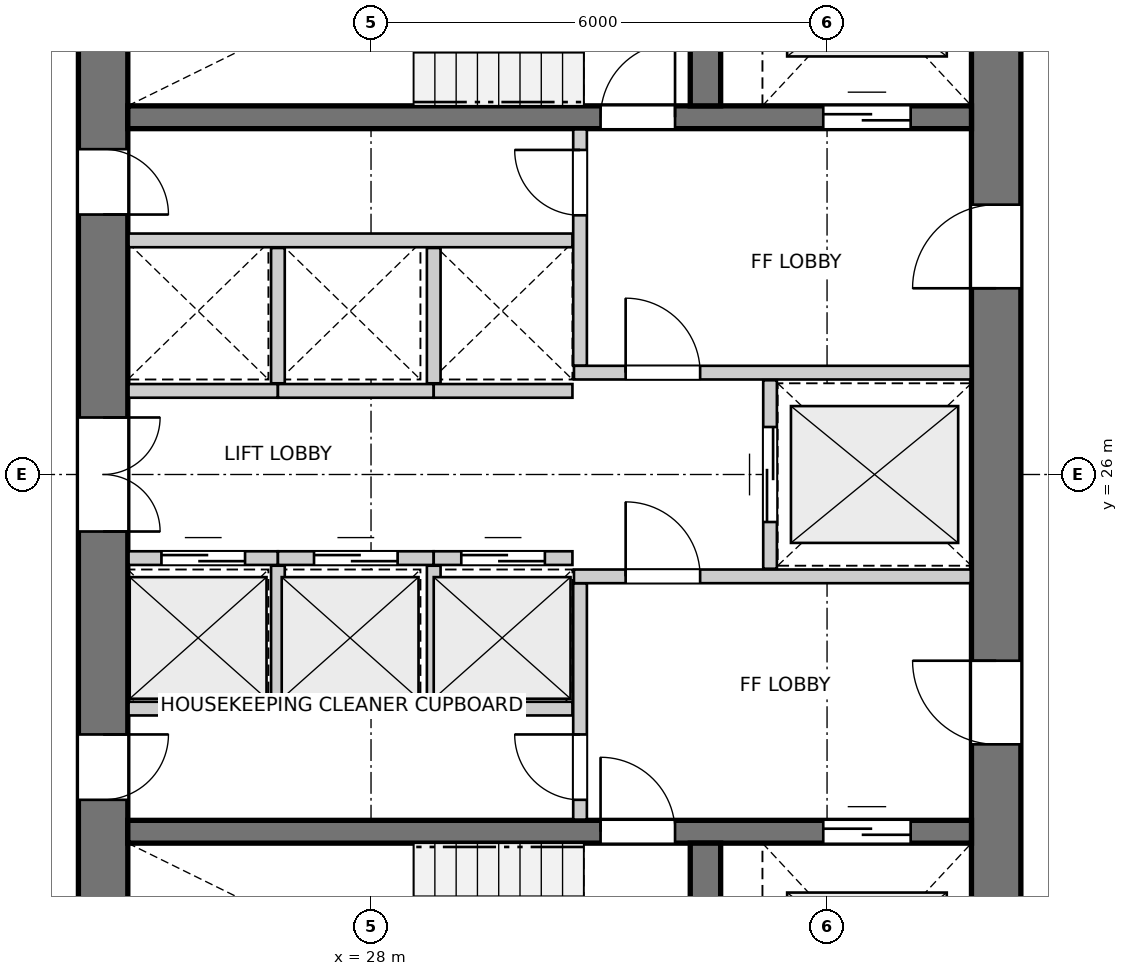
"""IFC4 building model, lengths in metres.
Left out: names, types, materials, properties, quantities, classifications, styles, units other than length and angle.
Written with IfcOpenShell. Run it as: python <this file> out.ifc"""

import sys

from ifc_helpers import new_model, si_unit, direction, frame, frame_2d, origin, place, context, subcontext, project, spatial, rectangle, extrude, source, transform, mapped, element, fill, save


model = new_model("IFC4")
c1 = context("Model", 3, precision=1e-05, world=origin(), true_north=direction((0.0, 1.0)))
c2 = subcontext(c1, "Body", "Model", "MODEL_VIEW")
j1 = project(units=[si_unit("LENGTHUNIT", "METRE"), si_unit("PLANEANGLEUNIT", "RADIAN")], contexts=[c1])
p1 = place(None, origin())
s1 = spatial("IfcSite", under=j1, at=p1, CompositionType="ELEMENT")
p2 = place(p1, origin())
s2 = spatial("IfcBuilding", under=s1, at=p2, CompositionType="ELEMENT")
p3 = place(p2, frame((0.0, 0.0, 76.8)))
s3 = spatial("IfcBuildingStorey", under=s2, at=p3, CompositionType="ELEMENT", Elevation=76.8)
p4 = place(p3, frame((24.475, 33.8, 0.0), z_axis=(0.0, 0.0, 1.0), x_axis=(0.0, -1.0, 0.0)))
e1 = element("IfcWall", 1, at=p4, inside=s3, PredefinedType="SHEAR", context=c2, shape_type="SweptSolid", body=[
    extrude(rectangle(XDim=15.6, YDim=0.65, at=frame_2d((7.8, 0.0))), origin(), (0.0, 0.0, 1.0), 2.935),
])
p5 = place(p4, frame((7.05, 0.0, 0.0)))
e2 = element("IfcOpeningElement", 2, at=p5, cuts=e1, PredefinedType="OPENING", context=c2, shape_type="SweptSolid", body=[
    extrude(rectangle(XDim=1.5, YDim=2.15, at=frame_2d((0.75, 1.075))), frame((0.0, 0.335, 0.0), z_axis=(0.0, -1.0, 0.0), x_axis=(1.0, 0.0, 0.0)), (0.0, 0.0, 1.0), 0.67),
])
p6 = place(p4, frame((3.52, 0.0, 0.0)))
e3 = element("IfcOpeningElement", 3, at=p6, cuts=e1, PredefinedType="OPENING", context=c2, shape_type="SweptSolid", body=[
    extrude(rectangle(XDim=0.86, YDim=2.05, at=frame_2d((0.43, 1.025))), frame((0.0, 0.335, 0.0), z_axis=(0.0, -1.0, 0.0), x_axis=(1.0, 0.0, 0.0)), (0.0, 0.0, 1.0), 0.67),
])
p7 = place(p4, frame((11.22, 0.0, 0.0)))
e4 = element("IfcOpeningElement", 4, at=p7, cuts=e1, PredefinedType="OPENING", context=c2, shape_type="SweptSolid", body=[
    extrude(rectangle(XDim=0.86, YDim=2.05, at=frame_2d((0.43, 1.025))), frame((0.0, 0.335, 0.0), z_axis=(0.0, -1.0, 0.0), x_axis=(1.0, 0.0, 0.0)), (0.0, 0.0, 1.0), 0.67),
])
p8 = place(p3, frame((36.225, 18.2, 0.0), z_axis=(0.0, 0.0, 1.0), x_axis=(0.0, 1.0, 0.0)))
e5 = element("IfcWall", 5, at=p8, inside=s3, PredefinedType="SHEAR", context=c2, shape_type="SweptSolid", body=[
    extrude(rectangle(XDim=15.6, YDim=0.65, at=frame_2d((7.8, 0.0))), origin(), (0.0, 0.0, 1.0), 2.935),
])
p9 = place(p8, frame((4.25, 0.0, 0.0)))
e6 = element("IfcOpeningElement", 6, at=p9, cuts=e5, PredefinedType="OPENING", context=c2, shape_type="SweptSolid", body=[
    extrude(rectangle(XDim=1.1, YDim=2.15, at=frame_2d((0.55, 1.075))), frame((0.0, 0.335, 0.0), z_axis=(0.0, -1.0, 0.0), x_axis=(1.0, 0.0, 0.0)), (0.0, 0.0, 1.0), 0.67),
])
p10 = place(p8, frame((10.25, 0.0, 0.0)))
e7 = element("IfcOpeningElement", 7, at=p10, cuts=e5, PredefinedType="OPENING", context=c2, shape_type="SweptSolid", body=[
    extrude(rectangle(XDim=1.1, YDim=2.15, at=frame_2d((0.55, 1.075))), frame((0.0, 0.335, 0.0), z_axis=(0.0, -1.0, 0.0), x_axis=(1.0, 0.0, 0.0)), (0.0, 0.0, 1.0), 0.67),
])
p11 = place(p3, frame((24.8, 21.3, 0.0), z_axis=(0.0, 0.0, 1.0), x_axis=(1.0, 0.0, 0.0)))
e8 = element("IfcWall", 8, at=p11, inside=s3, PredefinedType="SHEAR", context=c2, shape_type="SweptSolid", body=[
    extrude(rectangle(XDim=11.1, YDim=0.3, at=frame_2d((5.55, 0.0))), origin(), (0.0, 0.0, 1.0), 2.935),
])
p12 = place(p11, frame((6.22, 0.0, 0.0)))
e9 = element("IfcOpeningElement", 9, at=p12, cuts=e8, PredefinedType="OPENING", context=c2, shape_type="SweptSolid", body=[
    extrude(rectangle(XDim=0.98, YDim=2.15, at=frame_2d((0.49, 1.075))), frame((0.0, 0.16, 0.0), z_axis=(0.0, -1.0, 0.0), x_axis=(1.0, 0.0, 0.0)), (0.0, 0.0, 1.0), 0.32),
])
p13 = place(p11, frame((9.15, 0.0, 0.0)))
e10 = element("IfcOpeningElement", 10, at=p13, cuts=e8, PredefinedType="OPENING", context=c2, shape_type="SweptSolid", body=[
    extrude(rectangle(XDim=1.15, YDim=2.15, at=frame_2d((0.575, 1.075))), frame((0.0, 0.16, 0.0), z_axis=(0.0, -1.0, 0.0), x_axis=(1.0, 0.0, 0.0)), (0.0, 0.0, 1.0), 0.32),
])
p14 = place(p3, frame((32.4, 18.2, 0.0), z_axis=(0.0, 0.0, 1.0), x_axis=(0.0, 1.0, 0.0)))
e11 = element("IfcWall", 11, at=p14, inside=s3, PredefinedType="SHEAR", context=c2, shape_type="SweptSolid", body=[
    extrude(rectangle(XDim=2.95, YDim=0.4, at=frame_2d((1.475, 0.0))), origin(), (0.0, 0.0, 1.0), 2.935),
])
p15 = place(p3, frame((24.8, 30.7, 0.0), z_axis=(0.0, 0.0, 1.0), x_axis=(1.0, 0.0, 0.0)))
e12 = element("IfcWall", 12, at=p15, inside=s3, PredefinedType="SHEAR", context=c2, shape_type="SweptSolid", body=[
    extrude(rectangle(XDim=11.1, YDim=0.3, at=frame_2d((5.55, 0.0))), origin(), (0.0, 0.0, 1.0), 2.935),
])
p16 = place(p15, frame((6.22, 0.0, 0.0)))
e13 = element("IfcOpeningElement", 13, at=p16, cuts=e12, PredefinedType="OPENING", context=c2, shape_type="SweptSolid", body=[
    extrude(rectangle(XDim=0.98, YDim=2.15, at=frame_2d((0.49, 1.075))), frame((0.0, 0.16, 0.0), z_axis=(0.0, -1.0, 0.0), x_axis=(1.0, 0.0, 0.0)), (0.0, 0.0, 1.0), 0.32),
])
p17 = place(p15, frame((9.15, 0.0, 0.0)))
e14 = element("IfcOpeningElement", 14, at=p17, cuts=e12, PredefinedType="OPENING", context=c2, shape_type="SweptSolid", body=[
    extrude(rectangle(XDim=1.15, YDim=2.15, at=frame_2d((0.575, 1.075))), frame((0.0, 0.16, 0.0), z_axis=(0.0, -1.0, 0.0), x_axis=(1.0, 0.0, 0.0)), (0.0, 0.0, 1.0), 0.32),
])
p18 = place(p3, frame((32.4, 30.85, 0.0), z_axis=(0.0, 0.0, 1.0), x_axis=(0.0, 1.0, 0.0)))
e15 = element("IfcWall", 15, at=p18, inside=s3, PredefinedType="SHEAR", context=c2, shape_type="SweptSolid", body=[
    extrude(rectangle(XDim=2.95, YDim=0.4, at=frame_2d((1.475, 0.0))), origin(), (0.0, 0.0, 1.0), 2.935),
])
p19 = place(p3, frame((30.75, 21.46, 0.0), z_axis=(0.0, 0.0, 1.0), x_axis=(0.0, 1.0, 0.0)))
e16 = element("IfcWall", 16, at=p19, inside=s3, PredefinedType="PARTITIONING", context=c2, shape_type="SweptSolid", body=[
    extrude(rectangle(XDim=3.11, YDim=0.18, at=frame_2d((1.555, 0.0))), origin(), (0.0, 0.0, 1.0), 2.935),
])
p20 = place(p19, frame((0.26, 0.0, 0.0)))
e17 = element("IfcOpeningElement", 17, at=p20, cuts=e16, PredefinedType="OPENING", context=c2, shape_type="SweptSolid", body=[
    extrude(rectangle(XDim=0.86, YDim=2.05, at=frame_2d((0.43, 1.025))), frame((0.0, 0.1, 0.0), z_axis=(0.0, -1.0, 0.0), x_axis=(1.0, 0.0, 0.0)), (0.0, 0.0, 1.0), 0.2),
])
p21 = place(p3, frame((30.67, 24.66, 0.0), z_axis=(0.0, 0.0, 1.0), x_axis=(1.0, 0.0, 0.0)))
e18 = element("IfcWall", 18, at=p21, inside=s3, PredefinedType="PARTITIONING", context=c2, shape_type="SweptSolid", body=[
    extrude(rectangle(XDim=5.22, YDim=0.18, at=frame_2d((2.61, 0.0))), origin(), (0.0, 0.0, 1.0), 2.935),
])
p22 = place(p21, frame((0.68, 0.0, 0.0)))
e19 = element("IfcOpeningElement", 19, at=p22, cuts=e18, PredefinedType="OPENING", context=c2, shape_type="SweptSolid", body=[
    extrude(rectangle(XDim=0.98, YDim=2.15, at=frame_2d((0.49, 1.075))), frame((0.0, 0.1, 0.0), z_axis=(0.0, -1.0, 0.0), x_axis=(1.0, 0.0, 0.0)), (0.0, 0.0, 1.0), 0.2),
])
p23 = place(p3, frame((30.75, 27.43, 0.0), z_axis=(0.0, 0.0, 1.0), x_axis=(0.0, 1.0, 0.0)))
e20 = element("IfcWall", 20, at=p23, inside=s3, PredefinedType="PARTITIONING", context=c2, shape_type="SweptSolid", body=[
    extrude(rectangle(XDim=3.11, YDim=0.18, at=frame_2d((1.555, 0.0))), origin(), (0.0, 0.0, 1.0), 2.935),
])
p24 = place(p23, frame((1.98, 0.0, 0.0)))
e21 = element("IfcOpeningElement", 21, at=p24, cuts=e20, PredefinedType="OPENING", context=c2, shape_type="SweptSolid", body=[
    extrude(rectangle(XDim=0.86, YDim=2.05, at=frame_2d((0.43, 1.025))), frame((0.0, 0.1, 0.0), z_axis=(0.0, -1.0, 0.0), x_axis=(1.0, 0.0, 0.0)), (0.0, 0.0, 1.0), 0.2),
])
p25 = place(p3, frame((30.67, 27.34, 0.0), z_axis=(0.0, 0.0, 1.0), x_axis=(1.0, 0.0, 0.0)))
e22 = element("IfcWall", 22, at=p25, inside=s3, PredefinedType="PARTITIONING", context=c2, shape_type="SweptSolid", body=[
    extrude(rectangle(XDim=5.22, YDim=0.18, at=frame_2d((2.61, 0.0))), origin(), (0.0, 0.0, 1.0), 2.935),
])
p26 = place(p25, frame((0.68, 0.0, 0.0)))
e23 = element("IfcOpeningElement", 23, at=p26, cuts=e22, PredefinedType="OPENING", context=c2, shape_type="SweptSolid", body=[
    extrude(rectangle(XDim=0.98, YDim=2.15, at=frame_2d((0.49, 1.075))), frame((0.0, 0.1, 0.0), z_axis=(0.0, -1.0, 0.0), x_axis=(1.0, 0.0, 0.0)), (0.0, 0.0, 1.0), 0.2),
])
p27 = place(p3, frame((33.25, 24.76, 0.0), z_axis=(0.0, 0.0, 1.0), x_axis=(0.0, 1.0, 0.0)))
e24 = element("IfcWall", 24, at=p27, inside=s3, PredefinedType="PARTITIONING", context=c2, shape_type="SweptSolid", body=[
    extrude(rectangle(XDim=2.48, YDim=0.18, at=frame_2d((1.24, 0.0))), origin(), (0.0, 0.0, 1.0), 2.935),
])
p28 = place(p27, frame((0.615, 0.0, 0.0)))
e25 = element("IfcOpeningElement", 25, at=p28, cuts=e24, PredefinedType="OPENING", context=c2, shape_type="SweptSolid", body=[
    extrude(rectangle(XDim=1.25, YDim=2.15, at=frame_2d((0.625, 1.075))), frame((0.0, 0.1, 0.0), z_axis=(0.0, -1.0, 0.0), x_axis=(1.0, 0.0, 0.0)), (0.0, 0.0, 1.0), 0.2),
])
p29 = place(p3, frame((24.81, 22.92, 0.0), z_axis=(0.0, 0.0, 1.0), x_axis=(1.0, 0.0, 0.0)))
e26 = element("IfcWall", 26, at=p29, inside=s3, PredefinedType="PARTITIONING", context=c2, shape_type="SweptSolid", body=[
    extrude(rectangle(XDim=5.84, YDim=0.18, at=frame_2d((2.92, 0.0))), origin(), (0.0, 0.0, 1.0), 2.935),
])
p30 = place(p3, frame((24.81, 24.9, 0.0), z_axis=(0.0, 0.0, 1.0), x_axis=(1.0, 0.0, 0.0)))
e27 = element("IfcWall", 27, at=p30, inside=s3, PredefinedType="PARTITIONING", context=c2, shape_type="SweptSolid", body=[
    extrude(rectangle(XDim=1.965, YDim=0.18, at=frame_2d((0.982, 0.0))), origin(), (0.0, 0.0, 1.0), 2.935),
])
p31 = place(p30, frame((0.433, 0.0, 0.0)))
e28 = element("IfcOpeningElement", 28, at=p31, cuts=e27, PredefinedType="OPENING", context=c2, shape_type="SweptSolid", body=[
    extrude(rectangle(XDim=1.1, YDim=2.15, at=frame_2d((0.55, 1.075))), frame((0.0, 0.1, 0.0), z_axis=(0.0, -1.0, 0.0), x_axis=(1.0, 0.0, 0.0)), (0.0, 0.0, 1.0), 0.2),
])
p32 = place(p3, frame((26.775, 24.9, 0.0), z_axis=(0.0, 0.0, 1.0), x_axis=(1.0, 0.0, 0.0)))
e29 = element("IfcWall", 29, at=p32, inside=s3, PredefinedType="PARTITIONING", context=c2, shape_type="SweptSolid", body=[
    extrude(rectangle(XDim=2.05, YDim=0.18, at=frame_2d((1.025, 0.0))), origin(), (0.0, 0.0, 1.0), 2.935),
])
p33 = place(p32, frame((0.475, 0.0, 0.0)))
e30 = element("IfcOpeningElement", 30, at=p33, cuts=e29, PredefinedType="OPENING", context=c2, shape_type="SweptSolid", body=[
    extrude(rectangle(XDim=1.1, YDim=2.15, at=frame_2d((0.55, 1.075))), frame((0.0, 0.1, 0.0), z_axis=(0.0, -1.0, 0.0), x_axis=(1.0, 0.0, 0.0)), (0.0, 0.0, 1.0), 0.2),
])
p34 = place(p3, frame((26.775, 23.02, 0.0), z_axis=(0.0, 0.0, 1.0), x_axis=(0.0, 1.0, 0.0)))
e31 = element("IfcWall", 31, at=p34, inside=s3, PredefinedType="PARTITIONING", context=c2, shape_type="SweptSolid", body=[
    extrude(rectangle(XDim=1.78, YDim=0.18, at=frame_2d((0.89, 0.0))), origin(), (0.0, 0.0, 1.0), 2.935),
])
p35 = place(p3, frame((28.825, 24.9, 0.0), z_axis=(0.0, 0.0, 1.0), x_axis=(1.0, 0.0, 0.0)))
e32 = element("IfcWall", 32, at=p35, inside=s3, PredefinedType="PARTITIONING", context=c2, shape_type="SweptSolid", body=[
    extrude(rectangle(XDim=1.825, YDim=0.18, at=frame_2d((0.913, 0.0))), origin(), (0.0, 0.0, 1.0), 2.935),
])
p36 = place(p35, frame((0.363, 0.0, 0.0)))
e33 = element("IfcOpeningElement", 33, at=p36, cuts=e32, PredefinedType="OPENING", context=c2, shape_type="SweptSolid", body=[
    extrude(rectangle(XDim=1.1, YDim=2.15, at=frame_2d((0.55, 1.075))), frame((0.0, 0.1, 0.0), z_axis=(0.0, -1.0, 0.0), x_axis=(1.0, 0.0, 0.0)), (0.0, 0.0, 1.0), 0.2),
])
p37 = place(p3, frame((28.825, 23.02, 0.0), z_axis=(0.0, 0.0, 1.0), x_axis=(0.0, 1.0, 0.0)))
e34 = element("IfcWall", 34, at=p37, inside=s3, PredefinedType="PARTITIONING", context=c2, shape_type="SweptSolid", body=[
    extrude(rectangle(XDim=1.78, YDim=0.18, at=frame_2d((0.89, 0.0))), origin(), (0.0, 0.0, 1.0), 2.935),
])
p38 = place(p3, frame((24.81, 29.08, 0.0), z_axis=(0.0, 0.0, 1.0), x_axis=(1.0, 0.0, 0.0)))
e35 = element("IfcWall", 35, at=p38, inside=s3, PredefinedType="PARTITIONING", context=c2, shape_type="SweptSolid", body=[
    extrude(rectangle(XDim=5.84, YDim=0.18, at=frame_2d((2.92, 0.0))), origin(), (0.0, 0.0, 1.0), 2.935),
])
p39 = place(p3, frame((24.81, 27.1, 0.0), z_axis=(0.0, 0.0, 1.0), x_axis=(1.0, 0.0, 0.0)))
e36 = element("IfcWall", 36, at=p39, inside=s3, PredefinedType="PARTITIONING", context=c2, shape_type="SweptSolid", body=[
    extrude(rectangle(XDim=1.965, YDim=0.18, at=frame_2d((0.982, 0.0))), origin(), (0.0, 0.0, 1.0), 2.935),
])
p40 = place(p3, frame((26.775, 27.1, 0.0), z_axis=(0.0, 0.0, 1.0), x_axis=(1.0, 0.0, 0.0)))
e37 = element("IfcWall", 37, at=p40, inside=s3, PredefinedType="PARTITIONING", context=c2, shape_type="SweptSolid", body=[
    extrude(rectangle(XDim=2.05, YDim=0.18, at=frame_2d((1.025, 0.0))), origin(), (0.0, 0.0, 1.0), 2.935),
])
p41 = place(p3, frame((26.775, 27.2, 0.0), z_axis=(0.0, 0.0, 1.0), x_axis=(0.0, 1.0, 0.0)))
e38 = element("IfcWall", 38, at=p41, inside=s3, PredefinedType="PARTITIONING", context=c2, shape_type="SweptSolid", body=[
    extrude(rectangle(XDim=1.78, YDim=0.18, at=frame_2d((0.89, 0.0))), origin(), (0.0, 0.0, 1.0), 2.935),
])
p42 = place(p3, frame((28.825, 27.1, 0.0), z_axis=(0.0, 0.0, 1.0), x_axis=(1.0, 0.0, 0.0)))
e39 = element("IfcWall", 39, at=p42, inside=s3, PredefinedType="PARTITIONING", context=c2, shape_type="SweptSolid", body=[
    extrude(rectangle(XDim=1.825, YDim=0.18, at=frame_2d((0.913, 0.0))), origin(), (0.0, 0.0, 1.0), 2.935),
])
p43 = place(p3, frame((28.825, 27.2, 0.0), z_axis=(0.0, 0.0, 1.0), x_axis=(0.0, 1.0, 0.0)))
e40 = element("IfcWall", 40, at=p43, inside=s3, PredefinedType="PARTITIONING", context=c2, shape_type="SweptSolid", body=[
    extrude(rectangle(XDim=1.78, YDim=0.18, at=frame_2d((0.89, 0.0))), origin(), (0.0, 0.0, 1.0), 2.935),
])
m1 = source(origin(), c2, "Body", "SweptSolid", [
    extrude(rectangle(XDim=0.98, YDim=2.15, at=frame_2d((0.49, 1.075))), frame((0.0, 0.025, 0.0), z_axis=(0.0, -1.0, 0.0), x_axis=(1.0, 0.0, 0.0)), (0.0, 0.0, 1.0), 0.05),
])
p44 = place(p12, origin())
e41 = element("IfcDoor", 41, at=p44, inside=s3, OperationType="SINGLE_SWING_LEFT", PredefinedType="DOOR", context=c2, shape_type="MappedRepresentation", body=[
    mapped(m1, transform((0.0, 0.0, 0.0), x_axis=(1.0, 0.0, 0.0), y_axis=(0.0, 1.0, 0.0), z_axis=(0.0, 0.0, 1.0), scale=1.0)),
])
fill(e9, e41)
m2 = source(origin(), c2, "Body", "SweptSolid", [
    extrude(rectangle(XDim=1.15, YDim=2.15, at=frame_2d((0.575, 1.075))), frame((0.0, 0.025, 0.0), z_axis=(0.0, -1.0, 0.0), x_axis=(1.0, 0.0, 0.0)), (0.0, 0.0, 1.0), 0.05),
])
p45 = place(p13, origin())
e42 = element("IfcDoor", 42, at=p45, inside=s3, OperationType="DOUBLE_DOOR_SLIDING", PredefinedType="DOOR", context=c2, shape_type="MappedRepresentation", body=[
    mapped(m2, transform((0.0, 0.0, 0.0), x_axis=(1.0, 0.0, 0.0), y_axis=(0.0, 1.0, 0.0), z_axis=(0.0, 0.0, 1.0), scale=1.0)),
])
fill(e10, e42)
p46 = place(p16, origin())
e43 = element("IfcDoor", 43, at=p46, inside=s3, OperationType="SINGLE_SWING_RIGHT", PredefinedType="DOOR", context=c2, shape_type="MappedRepresentation", body=[
    mapped(m1, transform((0.0, 0.0, 0.0), x_axis=(1.0, 0.0, 0.0), y_axis=(0.0, 1.0, 0.0), z_axis=(0.0, 0.0, 1.0), scale=1.0)),
])
fill(e13, e43)
p47 = place(p17, origin())
e44 = element("IfcDoor", 44, at=p47, inside=s3, OperationType="DOUBLE_DOOR_SLIDING", PredefinedType="DOOR", context=c2, shape_type="MappedRepresentation", body=[
    mapped(m2, transform((0.0, 0.0, 0.0), x_axis=(1.0, 0.0, 0.0), y_axis=(0.0, 1.0, 0.0), z_axis=(0.0, 0.0, 1.0), scale=1.0)),
])
fill(e14, e44)
m3 = source(origin(), c2, "Body", "SweptSolid", [
    extrude(rectangle(XDim=1.1, YDim=2.15, at=frame_2d((0.55, 1.075))), frame((0.0, 0.025, 0.0), z_axis=(0.0, -1.0, 0.0), x_axis=(1.0, 0.0, 0.0)), (0.0, 0.0, 1.0), 0.05),
])
p48 = place(p9, origin())
e45 = element("IfcDoor", 45, at=p48, inside=s3, OperationType="SINGLE_SWING_RIGHT", PredefinedType="DOOR", context=c2, shape_type="MappedRepresentation", body=[
    mapped(m3, transform((0.0, 0.0, 0.0), x_axis=(1.0, 0.0, 0.0), y_axis=(0.0, 1.0, 0.0), z_axis=(0.0, 0.0, 1.0), scale=1.0)),
])
fill(e6, e45)
p49 = place(p10, origin())
e46 = element("IfcDoor", 46, at=p49, inside=s3, OperationType="SINGLE_SWING_LEFT", PredefinedType="DOOR", context=c2, shape_type="MappedRepresentation", body=[
    mapped(m3, transform((0.0, 0.0, 0.0), x_axis=(1.0, 0.0, 0.0), y_axis=(0.0, 1.0, 0.0), z_axis=(0.0, 0.0, 1.0), scale=1.0)),
])
fill(e7, e46)
m4 = source(origin(), c2, "Body", "SweptSolid", [
    extrude(rectangle(XDim=1.5, YDim=2.15, at=frame_2d((0.75, 1.075))), frame((0.0, 0.025, 0.0), z_axis=(0.0, -1.0, 0.0), x_axis=(1.0, 0.0, 0.0)), (0.0, 0.0, 1.0), 0.05),
])
p50 = place(p5, origin())
e47 = element("IfcDoor", 47, at=p50, inside=s3, OperationType="DOUBLE_DOOR_SINGLE_SWING", PredefinedType="DOOR", context=c2, shape_type="MappedRepresentation", body=[
    mapped(m4, transform((0.0, 0.0, 0.0), x_axis=(1.0, 0.0, 0.0), y_axis=(0.0, 1.0, 0.0), z_axis=(0.0, 0.0, 1.0), scale=1.0)),
])
fill(e2, e47)
m5 = source(origin(), c2, "Body", "SweptSolid", [
    extrude(rectangle(XDim=0.86, YDim=2.05, at=frame_2d((0.43, 1.025))), frame((0.0, 0.025, 0.0), z_axis=(0.0, -1.0, 0.0), x_axis=(1.0, 0.0, 0.0)), (0.0, 0.0, 1.0), 0.05),
])
p51 = place(p6, origin())
e48 = element("IfcDoor", 48, at=p51, inside=s3, OperationType="SINGLE_SWING_RIGHT", PredefinedType="DOOR", context=c2, shape_type="MappedRepresentation", body=[
    mapped(m5, transform((0.0, 0.0, 0.0), x_axis=(1.0, 0.0, 0.0), y_axis=(0.0, 1.0, 0.0), z_axis=(0.0, 0.0, 1.0), scale=1.0)),
])
fill(e3, e48)
p52 = place(p7, origin())
e49 = element("IfcDoor", 49, at=p52, inside=s3, OperationType="SINGLE_SWING_LEFT", PredefinedType="DOOR", context=c2, shape_type="MappedRepresentation", body=[
    mapped(m5, transform((0.0, 0.0, 0.0), x_axis=(1.0, 0.0, 0.0), y_axis=(0.0, 1.0, 0.0), z_axis=(0.0, 0.0, 1.0), scale=1.0)),
])
fill(e4, e49)
p53 = place(p20, origin())
e50 = element("IfcDoor", 50, at=p53, inside=s3, OperationType="SINGLE_SWING_RIGHT", PredefinedType="DOOR", context=c2, shape_type="MappedRepresentation", body=[
    mapped(m5, transform((0.0, 0.0, 0.0), x_axis=(1.0, 0.0, 0.0), y_axis=(0.0, 1.0, 0.0), z_axis=(0.0, 0.0, 1.0), scale=1.0)),
])
fill(e17, e50)
p54 = place(p22, origin())
e51 = element("IfcDoor", 51, at=p54, inside=s3, OperationType="SINGLE_SWING_LEFT", PredefinedType="DOOR", context=c2, shape_type="MappedRepresentation", body=[
    mapped(m1, transform((0.0, 0.0, 0.0), x_axis=(1.0, 0.0, 0.0), y_axis=(0.0, 1.0, 0.0), z_axis=(0.0, 0.0, 1.0), scale=1.0)),
])
fill(e19, e51)
p55 = place(p24, origin())
e52 = element("IfcDoor", 52, at=p55, inside=s3, OperationType="SINGLE_SWING_RIGHT", PredefinedType="DOOR", context=c2, shape_type="MappedRepresentation", body=[
    mapped(m5, transform((0.0, 0.0, 0.0), x_axis=(1.0, 0.0, 0.0), y_axis=(0.0, 1.0, 0.0), z_axis=(0.0, 0.0, 1.0), scale=1.0)),
])
fill(e21, e52)
p56 = place(p26, origin())
e53 = element("IfcDoor", 53, at=p56, inside=s3, OperationType="SINGLE_SWING_LEFT", PredefinedType="DOOR", context=c2, shape_type="MappedRepresentation", body=[
    mapped(m1, transform((0.0, 0.0, 0.0), x_axis=(1.0, 0.0, 0.0), y_axis=(0.0, 1.0, 0.0), z_axis=(0.0, 0.0, 1.0), scale=1.0)),
])
fill(e23, e53)
m6 = source(origin(), c2, "Body", "SweptSolid", [
    extrude(rectangle(XDim=1.25, YDim=2.15, at=frame_2d((0.625, 1.075))), frame((0.0, 0.025, 0.0), z_axis=(0.0, -1.0, 0.0), x_axis=(1.0, 0.0, 0.0)), (0.0, 0.0, 1.0), 0.05),
])
p57 = place(p28, origin())
e54 = element("IfcDoor", 54, at=p57, inside=s3, OperationType="DOUBLE_DOOR_SLIDING", PredefinedType="DOOR", context=c2, shape_type="MappedRepresentation", body=[
    mapped(m6, transform((0.0, 0.0, 0.0), x_axis=(1.0, 0.0, 0.0), y_axis=(0.0, 1.0, 0.0), z_axis=(0.0, 0.0, 1.0), scale=1.0)),
])
fill(e25, e54)
p58 = place(p31, origin())
e55 = element("IfcDoor", 55, at=p58, inside=s3, OperationType="DOUBLE_DOOR_SLIDING", PredefinedType="DOOR", context=c2, shape_type="MappedRepresentation", body=[
    mapped(m3, transform((0.0, 0.0, 0.0), x_axis=(1.0, 0.0, 0.0), y_axis=(0.0, 1.0, 0.0), z_axis=(0.0, 0.0, 1.0), scale=1.0)),
])
fill(e28, e55)
p59 = place(p33, origin())
e56 = element("IfcDoor", 56, at=p59, inside=s3, OperationType="DOUBLE_DOOR_SLIDING", PredefinedType="DOOR", context=c2, shape_type="MappedRepresentation", body=[
    mapped(m3, transform((0.0, 0.0, 0.0), x_axis=(1.0, 0.0, 0.0), y_axis=(0.0, 1.0, 0.0), z_axis=(0.0, 0.0, 1.0), scale=1.0)),
])
fill(e30, e56)
p60 = place(p36, origin())
e57 = element("IfcDoor", 57, at=p60, inside=s3, OperationType="DOUBLE_DOOR_SLIDING", PredefinedType="DOOR", context=c2, shape_type="MappedRepresentation", body=[
    mapped(m3, transform((0.0, 0.0, 0.0), x_axis=(1.0, 0.0, 0.0), y_axis=(0.0, 1.0, 0.0), z_axis=(0.0, 0.0, 1.0), scale=1.0)),
])
fill(e33, e57)
save(model, sys.argv[1])
